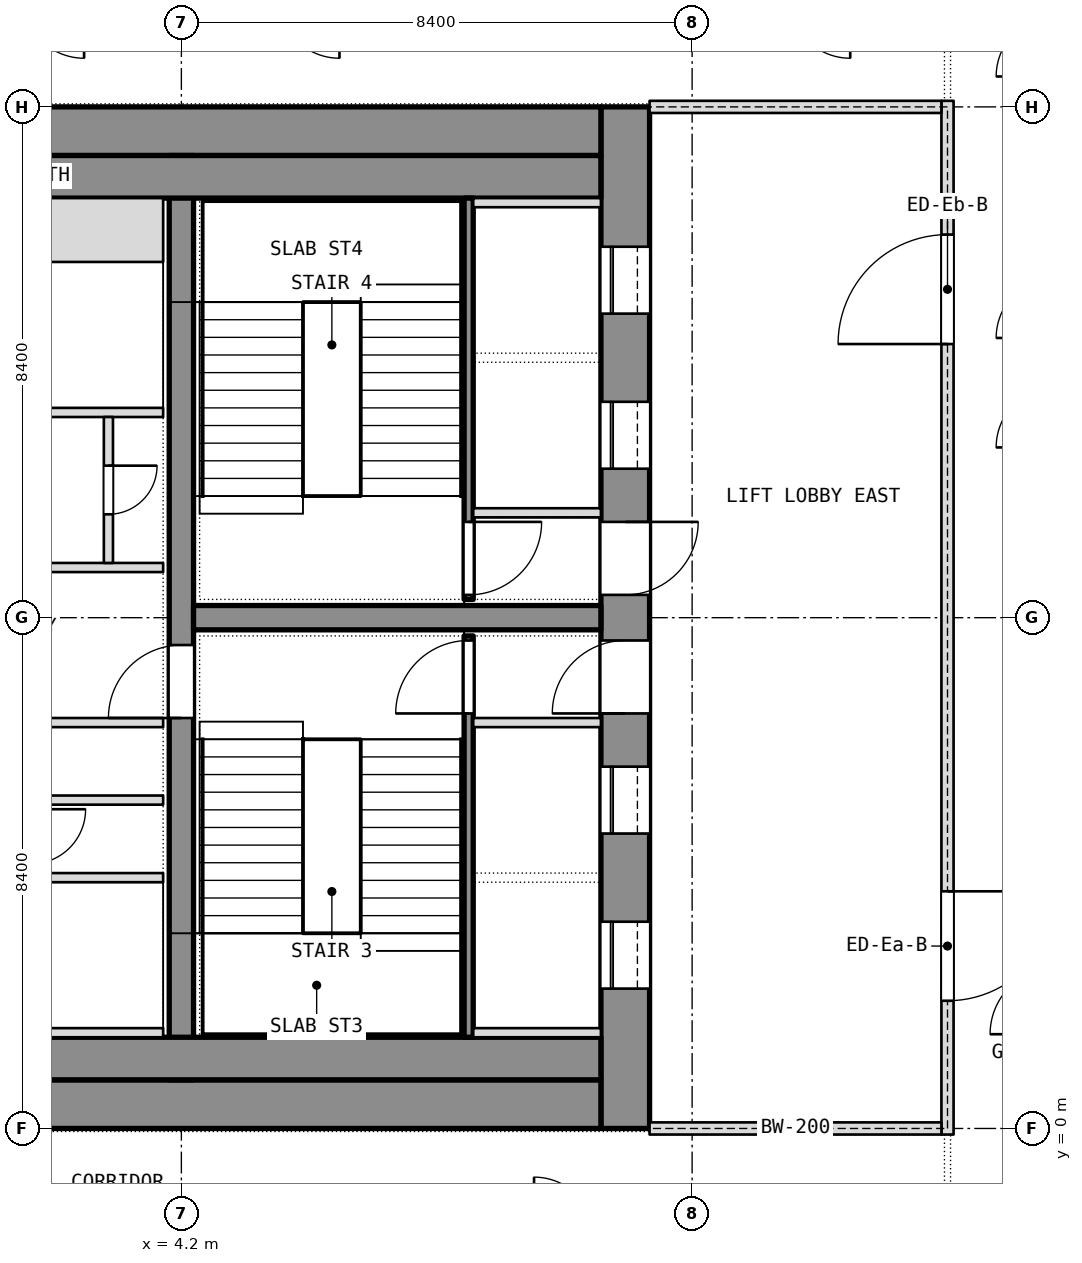
"""IFC4 building model, lengths in metres.
Left out: names, types, materials, properties, quantities, classifications, styles, units other than length and angle.
Written with IfcOpenShell. Run it as: python <this file> out.ifc"""

import sys

from ifc_helpers import new_model, si_unit, direction, frame, frame_2d, origin, place, context, subcontext, project, spatial, rectangle, extrude, element, fill, save


model = new_model("IFC4")
c1 = context("Model", 3, precision=1e-05, world=origin(), true_north=direction((0.0, 1.0)))
c2 = subcontext(c1, "Body", "Model", "MODEL_VIEW")
j1 = project(units=[si_unit("LENGTHUNIT", "METRE"), si_unit("PLANEANGLEUNIT", "RADIAN")], contexts=[c1])
p1 = place(None, origin())
s1 = spatial("IfcSite", under=j1, at=p1, CompositionType="ELEMENT")
p2 = place(p1, origin())
s2 = spatial("IfcBuilding", under=s1, at=p2, CompositionType="ELEMENT")
p3 = place(p2, frame((0.0, 0.0, 230.9)))
s3 = spatial("IfcBuildingStorey", under=s2, at=p3, CompositionType="ELEMENT", Elevation=230.9)
p4 = place(p3, frame((11.5, 0.0, 0.0), z_axis=(0.0, 0.0, 1.0), x_axis=(0.0, 1.0, 0.0)))
e1 = element("IfcWall", 1, at=p4, inside=s3, PredefinedType="SHEAR", context=c2, shape_type="SweptSolid", body=[
    extrude(rectangle(XDim=16.8, YDim=0.8, at=frame_2d((8.4, 0.0))), origin(), (0.0, 0.0, 1.0), 3.6),
])
p5 = place(p4, frame((2.3, 0.0, 0.0)))
e2 = element("IfcOpeningElement", 2, at=p5, cuts=e1, PredefinedType="OPENING", context=c2, shape_type="SweptSolid", body=[
    extrude(rectangle(XDim=1.1, YDim=2.1, at=frame_2d((0.55, 1.05))), frame((0.0, 0.4, 0.0), z_axis=(0.0, -1.0, 0.0), x_axis=(1.0, 0.0, 0.0)), (0.0, 0.0, 1.0), 0.8),
])
p6 = place(p4, frame((4.85, 0.0, 0.0)))
e3 = element("IfcOpeningElement", 3, at=p6, cuts=e1, PredefinedType="OPENING", context=c2, shape_type="SweptSolid", body=[
    extrude(rectangle(XDim=1.1, YDim=2.1, at=frame_2d((0.55, 1.05))), frame((0.0, 0.4, 0.0), z_axis=(0.0, -1.0, 0.0), x_axis=(1.0, 0.0, 0.0)), (0.0, 0.0, 1.0), 0.8),
])
p7 = place(p4, frame((6.825, 0.0, 0.0)))
e4 = element("IfcOpeningElement", 4, at=p7, cuts=e1, PredefinedType="OPENING", context=c2, shape_type="SweptSolid", body=[
    extrude(rectangle(XDim=1.2, YDim=2.1, at=frame_2d((0.6, 1.05))), frame((0.0, 0.4, 0.0), z_axis=(0.0, -1.0, 0.0), x_axis=(1.0, 0.0, 0.0)), (0.0, 0.0, 1.0), 0.8),
])
p8 = place(p4, frame((13.4, 0.0, 0.0)))
e5 = element("IfcOpeningElement", 5, at=p8, cuts=e1, PredefinedType="OPENING", context=c2, shape_type="SweptSolid", body=[
    extrude(rectangle(XDim=1.1, YDim=2.1, at=frame_2d((0.55, 1.05))), frame((0.0, 0.4, 0.0), z_axis=(0.0, -1.0, 0.0), x_axis=(1.0, 0.0, 0.0)), (0.0, 0.0, 1.0), 0.8),
])
p9 = place(p4, frame((10.85, 0.0, 0.0)))
e6 = element("IfcOpeningElement", 6, at=p9, cuts=e1, PredefinedType="OPENING", context=c2, shape_type="SweptSolid", body=[
    extrude(rectangle(XDim=1.1, YDim=2.1, at=frame_2d((0.55, 1.05))), frame((0.0, 0.4, 0.0), z_axis=(0.0, -1.0, 0.0), x_axis=(1.0, 0.0, 0.0)), (0.0, 0.0, 1.0), 0.8),
])
p10 = place(p4, frame((8.775, 0.0, 0.0)))
e7 = element("IfcOpeningElement", 7, at=p10, cuts=e1, PredefinedType="OPENING", context=c2, shape_type="SweptSolid", body=[
    extrude(rectangle(XDim=1.2, YDim=2.1, at=frame_2d((0.6, 1.05))), frame((0.0, 0.4, 0.0), z_axis=(0.0, -1.0, 0.0), x_axis=(1.0, 0.0, 0.0)), (0.0, 0.0, 1.0), 0.8),
])
for number, where, z_axis, x_axis in (
    (8, (-11.1, 0.4, 0.0), (0.0, 0.0, 1.0), (1.0, 0.0, 0.0)),
    (9, (-11.1, 16.4, 0.0), (0.0, 0.0, 1.0), (1.0, 0.0, 0.0)),
):
    element("IfcWall", number, at=place(p3, frame(where, z_axis=z_axis, x_axis=x_axis)), inside=s3, PredefinedType="SHEAR", context=c2, shape_type="SweptSolid", body=[
        extrude(rectangle(XDim=22.2, YDim=0.8, at=frame_2d((11.1, 0.0))), origin(), (0.0, 0.0, 1.0), 3.6),
    ])
p11 = place(p3, frame((4.2, 0.8, 0.0), z_axis=(0.0, 0.0, 1.0), x_axis=(0.0, 1.0, 0.0)))
e10 = element("IfcWall", 10, at=p11, inside=s3, PredefinedType="SHEAR", context=c2, shape_type="SweptSolid", body=[
    extrude(rectangle(XDim=15.2, YDim=0.4, at=frame_2d((7.6, 0.0))), origin(), (0.0, 0.0, 1.0), 3.6),
])
p12 = place(p11, frame((5.95, 0.0, 0.0)))
e11 = element("IfcOpeningElement", 11, at=p12, cuts=e10, PredefinedType="OPENING", context=c2, shape_type="SweptSolid", body=[
    extrude(rectangle(XDim=1.2, YDim=2.1, at=frame_2d((0.6, 1.05))), frame((0.0, 0.2, 0.0), z_axis=(0.0, -1.0, 0.0), x_axis=(1.0, 0.0, 0.0)), (0.0, 0.0, 1.0), 0.4),
])
p13 = place(p3, frame((4.4, 8.4, 0.0), z_axis=(0.0, 0.0, 1.0), x_axis=(1.0, 0.0, 0.0)))
e12 = element("IfcWall", 12, at=p13, inside=s3, PredefinedType="SHEAR", context=c2, shape_type="SweptSolid", body=[
    extrude(rectangle(XDim=6.7, YDim=0.4, at=frame_2d((3.35, 0.0))), origin(), (0.0, 0.0, 1.0), 3.6),
])
for number, where, z_axis, x_axis in (
    (13, (-11.1, 1.15, 0.0), (0.0, 0.0, 1.0), (1.0, 0.0, 0.0)),
    (14, (-11.1, 15.65, 0.0), (0.0, 0.0, 1.0), (1.0, 0.0, 0.0)),
):
    element("IfcWall", number, at=place(p3, frame(where, z_axis=z_axis, x_axis=x_axis)), inside=s3, PredefinedType="PARTITIONING", context=c2, shape_type="SweptSolid", body=[
        extrude(rectangle(XDim=22.2, YDim=0.7, at=frame_2d((11.1, 0.0))), origin(), (0.0, 0.0, 1.0), 3.34),
    ])
p14 = place(p3, frame((8.925, 1.5, 0.0), z_axis=(0.0, 0.0, 1.0), x_axis=(0.0, 1.0, 0.0)))
e15 = element("IfcWall", 15, at=p14, inside=s3, PredefinedType="SHEAR", context=c2, shape_type="SweptSolid", body=[
    extrude(rectangle(XDim=6.6, YDim=0.15, at=frame_2d((3.3, 0.0))), origin(), (0.0, 0.0, 1.0), 3.34),
])
p15 = place(p14, frame((5.325, 0.0, 0.0)))
e16 = element("IfcOpeningElement", 16, at=p15, cuts=e15, PredefinedType="OPENING", context=c2, shape_type="SweptSolid", body=[
    extrude(rectangle(XDim=1.2, YDim=2.1, at=frame_2d((0.6, 1.05))), frame((0.0, 0.075, 0.0), z_axis=(0.0, -1.0, 0.0), x_axis=(1.0, 0.0, 0.0)), (0.0, 0.0, 1.0), 0.15),
])
for number, where, z_axis, x_axis in (
    (17, (9.0, 6.675, 0.0), (0.0, 0.0, 1.0), (1.0, 0.0, 0.0)),
    (18, (9.0, 1.575, 0.0), (0.0, 0.0, 1.0), (1.0, 0.0, 0.0)),
):
    element("IfcWall", number, at=place(p3, frame(where, z_axis=z_axis, x_axis=x_axis)), inside=s3, PredefinedType="SHEAR", context=c2, shape_type="SweptSolid", body=[
        extrude(rectangle(XDim=2.1, YDim=0.15, at=frame_2d((1.05, 0.0))), origin(), (0.0, 0.0, 1.0), 3.6),
    ])
p16 = place(p3, frame((8.925, 8.7, 0.0), z_axis=(0.0, 0.0, 1.0), x_axis=(0.0, 1.0, 0.0)))
e19 = element("IfcWall", 19, at=p16, inside=s3, PredefinedType="SHEAR", context=c2, shape_type="SweptSolid", body=[
    extrude(rectangle(XDim=6.6, YDim=0.15, at=frame_2d((3.3, 0.0))), origin(), (0.0, 0.0, 1.0), 3.34),
])
p17 = place(p16, frame((0.075, 0.0, 0.0)))
e20 = element("IfcOpeningElement", 20, at=p17, cuts=e19, PredefinedType="OPENING", context=c2, shape_type="SweptSolid", body=[
    extrude(rectangle(XDim=1.2, YDim=2.1, at=frame_2d((0.6, 1.05))), frame((0.0, 0.075, 0.0), z_axis=(0.0, -1.0, 0.0), x_axis=(1.0, 0.0, 0.0)), (0.0, 0.0, 1.0), 0.15),
])
for number, where, z_axis, x_axis in (
    (21, (9.0, 10.125, 0.0), (0.0, 0.0, 1.0), (1.0, 0.0, 0.0)),
    (22, (9.0, 15.225, 0.0), (0.0, 0.0, 1.0), (1.0, 0.0, 0.0)),
):
    element("IfcWall", number, at=place(p3, frame(where, z_axis=z_axis, x_axis=x_axis)), inside=s3, PredefinedType="SHEAR", context=c2, shape_type="SweptSolid", body=[
        extrude(rectangle(XDim=2.1, YDim=0.15, at=frame_2d((1.05, 0.0))), origin(), (0.0, 0.0, 1.0), 3.6),
    ])
p18 = place(p3, frame((-3.9, 4.125, 0.0), z_axis=(0.0, 0.0, 1.0), x_axis=(1.0, 0.0, 0.0)))
e23 = element("IfcWall", 23, at=p18, inside=s3, PredefinedType="PARTITIONING", context=c2, shape_type="SweptSolid", body=[
    extrude(rectangle(XDim=7.8, YDim=0.15, at=frame_2d((3.9, 0.0))), origin(), (0.0, 0.0, 1.0), 3.34),
])
p19 = place(p18, frame((3.75, 0.0, 0.0)))
e24 = element("IfcOpeningElement", 24, at=p19, cuts=e23, PredefinedType="OPENING", context=c2, shape_type="SweptSolid", body=[
    extrude(rectangle(XDim=1.2, YDim=2.1, at=frame_2d((0.6, 1.05))), frame((0.0, 0.075, 0.0), z_axis=(0.0, -1.0, 0.0), x_axis=(1.0, 0.0, 0.0)), (0.0, 0.0, 1.0), 0.15),
])
p20 = place(p3, frame((-3.9, 11.775, 0.0), z_axis=(0.0, 0.0, 1.0), x_axis=(1.0, 0.0, 0.0)))
e25 = element("IfcWall", 25, at=p20, inside=s3, PredefinedType="PARTITIONING", context=c2, shape_type="SweptSolid", body=[
    extrude(rectangle(XDim=7.8, YDim=0.15, at=frame_2d((3.9, 0.0))), origin(), (0.0, 0.0, 1.0), 3.34),
])
p21 = place(p20, frame((3.3, 0.0, 0.0)))
e26 = element("IfcOpeningElement", 26, at=p21, cuts=e25, PredefinedType="OPENING", context=c2, shape_type="SweptSolid", body=[
    extrude(rectangle(XDim=1.2, YDim=2.1, at=frame_2d((0.6, 1.05))), frame((0.0, 0.075, 0.0), z_axis=(0.0, -1.0, 0.0), x_axis=(1.0, 0.0, 0.0)), (0.0, 0.0, 1.0), 0.15),
])
p22 = place(p3, frame((1.65, 1.575, 0.0), z_axis=(0.0, 0.0, 1.0), x_axis=(1.0, 0.0, 0.0)))
e27 = element("IfcWall", 27, at=p22, inside=s3, PredefinedType="SHEAR", context=c2, shape_type="SweptSolid", body=[
    extrude(rectangle(XDim=2.25, YDim=0.15, at=frame_2d((1.125, 0.0))), origin(), (0.0, 0.0, 1.0), 3.6),
])
p23 = place(p3, frame((1.65, 14.775, 0.0), z_axis=(0.0, 0.0, 1.0), x_axis=(1.0, 0.0, 0.0)))
e28 = element("IfcWall", 28, at=p23, inside=s3, PredefinedType="SHEAR", context=c2, shape_type="SweptSolid", body=[
    extrude(rectangle(XDim=2.25, YDim=1.05, at=frame_2d((1.125, 0.0))), origin(), (0.0, 0.0, 1.0), 3.6),
])
for number, where, z_axis, x_axis in (
    (29, (1.65, 6.675, 0.0), (0.0, 0.0, 1.0), (1.0, 0.0, 0.0)),
    (30, (1.65, 9.225, 0.0), (0.0, 0.0, 1.0), (1.0, 0.0, 0.0)),
):
    element("IfcWall", number, at=place(p3, frame(where, z_axis=z_axis, x_axis=x_axis)), inside=s3, PredefinedType="PARTITIONING", context=c2, shape_type="SweptSolid", body=[
        extrude(rectangle(XDim=2.25, YDim=0.15, at=frame_2d((1.125, 0.0))), origin(), (0.0, 0.0, 1.0), 3.34),
    ])
p24 = place(p3, frame((1.8, 5.4, 0.0), z_axis=(0.0, 0.0, 1.0), x_axis=(1.0, 0.0, 0.0)))
e31 = element("IfcWall", 31, at=p24, inside=s3, PredefinedType="PARTITIONING", context=c2, shape_type="SweptSolid", body=[
    extrude(rectangle(XDim=2.1, YDim=0.15, at=frame_2d((1.05, 0.0))), origin(), (0.0, 0.0, 1.0), 3.34),
])
p25 = place(p3, frame((3.0, 9.3, 0.0), z_axis=(0.0, 0.0, 1.0), x_axis=(0.0, 1.0, 0.0)))
e32 = element("IfcWall", 32, at=p25, inside=s3, PredefinedType="PARTITIONING", context=c2, shape_type="SweptSolid", body=[
    extrude(rectangle(XDim=2.4, YDim=0.15, at=frame_2d((1.2, 0.0))), origin(), (0.0, 0.0, 1.0), 3.34),
])
p26 = place(p25, frame((0.8, 0.0, 0.0)))
e33 = element("IfcOpeningElement", 33, at=p26, cuts=e32, PredefinedType="OPENING", context=c2, shape_type="SweptSolid", body=[
    extrude(rectangle(XDim=0.8, YDim=2.1, at=frame_2d((0.4, 1.05))), frame((0.0, 0.075, 0.0), z_axis=(0.0, -1.0, 0.0), x_axis=(1.0, 0.0, 0.0)), (0.0, 0.0, 1.0), 0.15),
])
p27 = place(p3, frame((16.8, -0.1, 0.0), z_axis=(0.0, 0.0, 1.0), x_axis=(0.0, 1.0, 0.0)))
e34 = element("IfcWall", 34, at=p27, inside=s3, PredefinedType="PARTITIONING", context=c2, shape_type="SweptSolid", body=[
    extrude(rectangle(XDim=17.0, YDim=0.2, at=frame_2d((8.5, 0.0))), origin(), (0.0, 0.0, 1.0), 3.34),
])
p28 = place(p27, frame((2.2, 0.0, 0.0)))
e35 = element("IfcOpeningElement", 35, at=p28, cuts=e34, PredefinedType="OPENING", context=c2, shape_type="SweptSolid", body=[
    extrude(rectangle(XDim=1.8, YDim=2.1, at=frame_2d((0.9, 1.05))), frame((0.0, 0.1, 0.0), z_axis=(0.0, -1.0, 0.0), x_axis=(1.0, 0.0, 0.0)), (0.0, 0.0, 1.0), 0.2),
])
p29 = place(p27, frame((13.0, 0.0, 0.0)))
e36 = element("IfcOpeningElement", 36, at=p29, cuts=e34, PredefinedType="OPENING", context=c2, shape_type="SweptSolid", body=[
    extrude(rectangle(XDim=1.8, YDim=2.1, at=frame_2d((0.9, 1.05))), frame((0.0, 0.1, 0.0), z_axis=(0.0, -1.0, 0.0), x_axis=(1.0, 0.0, 0.0)), (0.0, 0.0, 1.0), 0.2),
])
for number, where, z_axis, x_axis in (
    (37, (11.9, 0.0, 0.0), (0.0, 0.0, 1.0), (1.0, 0.0, 0.0)),
    (38, (11.9, 16.8, 0.0), (0.0, 0.0, 1.0), (1.0, 0.0, 0.0)),
):
    element("IfcWall", number, at=place(p3, frame(where, z_axis=z_axis, x_axis=x_axis)), inside=s3, PredefinedType="PARTITIONING", context=c2, shape_type="SweptSolid", body=[
        extrude(rectangle(XDim=4.8, YDim=0.2, at=frame_2d((2.4, 0.0))), origin(), (0.0, 0.0, 1.0), 2.94),
    ])
p30 = place(p5, origin())
e39 = element("IfcDoor", 39, at=p30, inside=s3, OperationType="SLIDING_TO_LEFT", PredefinedType="DOOR", context=c2, shape_type="SweptSolid", body=[
    extrude(rectangle(XDim=1.1, YDim=2.1, at=frame_2d((0.55, 1.05))), frame((0.0, 0.025, 0.0), z_axis=(0.0, -1.0, 0.0), x_axis=(1.0, 0.0, 0.0)), (0.0, 0.0, 1.0), 0.05),
])
fill(e2, e39)
p31 = place(p6, origin())
e40 = element("IfcDoor", 40, at=p31, inside=s3, OperationType="SLIDING_TO_LEFT", PredefinedType="DOOR", context=c2, shape_type="SweptSolid", body=[
    extrude(rectangle(XDim=1.1, YDim=2.1, at=frame_2d((0.55, 1.05))), frame((0.0, 0.025, 0.0), z_axis=(0.0, -1.0, 0.0), x_axis=(1.0, 0.0, 0.0)), (0.0, 0.0, 1.0), 0.05),
])
fill(e3, e40)
p32 = place(p7, origin())
e41 = element("IfcDoor", 41, at=p32, inside=s3, OperationType="SINGLE_SWING_LEFT", PredefinedType="DOOR", context=c2, shape_type="SweptSolid", body=[
    extrude(rectangle(XDim=1.2, YDim=2.1, at=frame_2d((0.6, 1.05))), frame((0.0, 0.025, 0.0), z_axis=(0.0, -1.0, 0.0), x_axis=(1.0, 0.0, 0.0)), (0.0, 0.0, 1.0), 0.05),
])
fill(e4, e41)
p33 = place(p15, origin())
e42 = element("IfcDoor", 42, at=p33, inside=s3, OperationType="SINGLE_SWING_LEFT", PredefinedType="DOOR", context=c2, shape_type="SweptSolid", body=[
    extrude(rectangle(XDim=1.2, YDim=2.1, at=frame_2d((0.6, 1.05))), frame((0.0, 0.025, 0.0), z_axis=(0.0, -1.0, 0.0), x_axis=(1.0, 0.0, 0.0)), (0.0, 0.0, 1.0), 0.05),
])
fill(e16, e42)
p34 = place(p8, origin())
e43 = element("IfcDoor", 43, at=p34, inside=s3, OperationType="SLIDING_TO_LEFT", PredefinedType="DOOR", context=c2, shape_type="SweptSolid", body=[
    extrude(rectangle(XDim=1.1, YDim=2.1, at=frame_2d((0.55, 1.05))), frame((0.0, 0.025, 0.0), z_axis=(0.0, -1.0, 0.0), x_axis=(1.0, 0.0, 0.0)), (0.0, 0.0, 1.0), 0.05),
])
fill(e5, e43)
p35 = place(p9, origin())
e44 = element("IfcDoor", 44, at=p35, inside=s3, OperationType="SLIDING_TO_LEFT", PredefinedType="DOOR", context=c2, shape_type="SweptSolid", body=[
    extrude(rectangle(XDim=1.1, YDim=2.1, at=frame_2d((0.55, 1.05))), frame((0.0, 0.025, 0.0), z_axis=(0.0, -1.0, 0.0), x_axis=(1.0, 0.0, 0.0)), (0.0, 0.0, 1.0), 0.05),
])
fill(e6, e44)
p36 = place(p10, origin())
e45 = element("IfcDoor", 45, at=p36, inside=s3, OperationType="SINGLE_SWING_LEFT", PredefinedType="DOOR", context=c2, shape_type="SweptSolid", body=[
    extrude(rectangle(XDim=1.2, YDim=2.1, at=frame_2d((0.6, 1.05))), frame((0.0, 0.025, 0.0), z_axis=(0.0, -1.0, 0.0), x_axis=(1.0, 0.0, 0.0)), (0.0, 0.0, 1.0), 0.05),
])
fill(e7, e45)
p37 = place(p17, origin())
e46 = element("IfcDoor", 46, at=p37, inside=s3, OperationType="SINGLE_SWING_LEFT", PredefinedType="DOOR", context=c2, shape_type="SweptSolid", body=[
    extrude(rectangle(XDim=1.2, YDim=2.1, at=frame_2d((0.6, 1.05))), frame((0.0, 0.025, 0.0), z_axis=(0.0, -1.0, 0.0), x_axis=(1.0, 0.0, 0.0)), (0.0, 0.0, 1.0), 0.05),
])
fill(e20, e46)
p38 = place(p26, origin())
e47 = element("IfcDoor", 47, at=p38, inside=s3, OperationType="SINGLE_SWING_LEFT", PredefinedType="DOOR", context=c2, shape_type="SweptSolid", body=[
    extrude(rectangle(XDim=0.8, YDim=2.1, at=frame_2d((0.4, 1.05))), frame((0.0, 0.025, 0.0), z_axis=(0.0, -1.0, 0.0), x_axis=(1.0, 0.0, 0.0)), (0.0, 0.0, 1.0), 0.05),
])
fill(e33, e47)
p39 = place(p12, origin())
e48 = element("IfcDoor", 48, at=p39, inside=s3, OperationType="SINGLE_SWING_LEFT", PredefinedType="DOOR", context=c2, shape_type="SweptSolid", body=[
    extrude(rectangle(XDim=1.2, YDim=2.1, at=frame_2d((0.6, 1.05))), frame((0.0, 0.025, 0.0), z_axis=(0.0, -1.0, 0.0), x_axis=(1.0, 0.0, 0.0)), (0.0, 0.0, 1.0), 0.05),
])
fill(e11, e48)
p40 = place(p28, origin())
e49 = element("IfcDoor", 49, at=p40, inside=s3, OperationType="DOUBLE_DOOR_SINGLE_SWING", PredefinedType="DOOR", context=c2, shape_type="SweptSolid", body=[
    extrude(rectangle(XDim=1.8, YDim=2.1, at=frame_2d((0.9, 1.05))), frame((0.0, 0.025, 0.0), z_axis=(0.0, -1.0, 0.0), x_axis=(1.0, 0.0, 0.0)), (0.0, 0.0, 1.0), 0.05),
])
fill(e35, e49)
p41 = place(p29, origin())
e50 = element("IfcDoor", 50, at=p41, inside=s3, OperationType="DOUBLE_DOOR_SINGLE_SWING", PredefinedType="DOOR", context=c2, shape_type="SweptSolid", body=[
    extrude(rectangle(XDim=1.8, YDim=2.1, at=frame_2d((0.9, 1.05))), frame((0.0, 0.025, 0.0), z_axis=(0.0, -1.0, 0.0), x_axis=(1.0, 0.0, 0.0)), (0.0, 0.0, 1.0), 0.05),
])
fill(e36, e50)
save(model, sys.argv[1])
